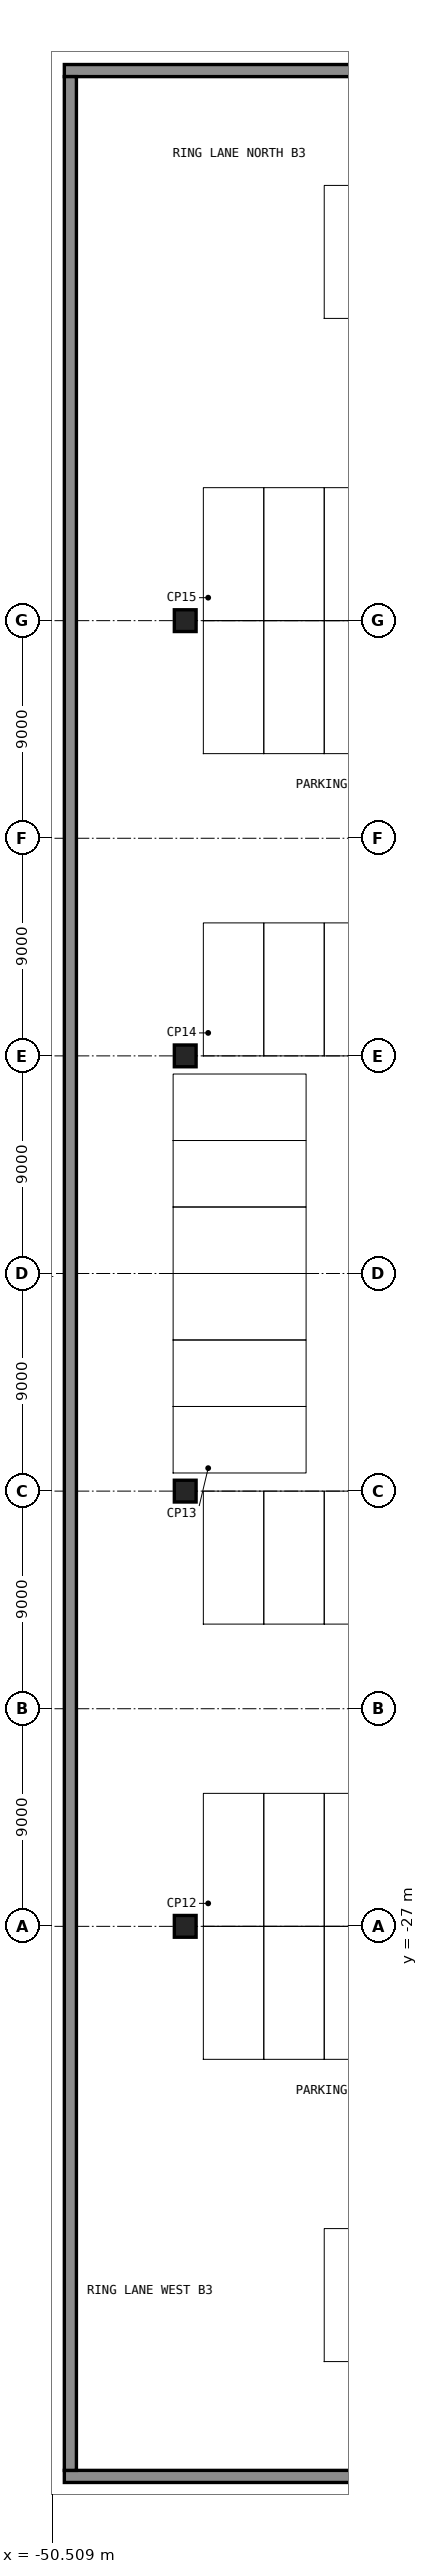
"""IFC4 building model, lengths in metres.
Left out: names, types, materials, properties, quantities, classifications, styles, units other than length and angle.
Written with IfcOpenShell. Run it as: python <this file> out.ifc"""

import sys

from ifc_helpers import new_model, si_unit, direction, frame, frame_2d, origin, origin_2d, place, context, subcontext, project, spatial, rectangle, extrude, element, save


model = new_model("IFC4")
c1 = context("Model", 3, precision=1e-05, world=origin(), true_north=direction((0.0, 1.0)))
c2 = subcontext(c1, "Body", "Model", "MODEL_VIEW")
j1 = project(units=[si_unit("LENGTHUNIT", "METRE"), si_unit("PLANEANGLEUNIT", "RADIAN")], contexts=[c1])
p1 = place(None, origin())
s1 = spatial("IfcSite", under=j1, at=p1, CompositionType="ELEMENT")
p2 = place(p1, origin())
s2 = spatial("IfcBuilding", under=s1, at=p2, CompositionType="ELEMENT")
p3 = place(p2, frame((0.0, 0.0, -12.9)))
s3 = spatial("IfcBuildingStorey", under=s2, at=p3, CompositionType="ELEMENT", Elevation=-12.9)
for number, where, z_axis, x_axis in (
    (1, (-50.0, 49.75, -0.3), (0.0, 0.0, 1.0), (1.0, 0.0, 0.0)),
    (2, (-50.0, -49.75, -0.3), (0.0, 0.0, 1.0), (1.0, 0.0, 0.0)),
):
    element("IfcWall", number, at=place(p3, frame(where, z_axis=z_axis, x_axis=x_axis)), inside=s3, PredefinedType="SOLIDWALL", context=c2, shape_type="SweptSolid", body=[
        extrude(rectangle(XDim=100.0, YDim=0.5, at=frame_2d((50.0, 0.0))), origin(), (0.0, 0.0, 1.0), 4.2),
    ])
p4 = place(p3, frame((-49.75, -49.5, -0.3), z_axis=(0.0, 0.0, 1.0), x_axis=(0.0, 1.0, 0.0)))
e3 = element("IfcWall", 3, at=p4, inside=s3, PredefinedType="SOLIDWALL", context=c2, shape_type="SweptSolid", body=[
    extrude(rectangle(XDim=99.0, YDim=0.5, at=frame_2d((49.5, 0.0))), origin(), (0.0, 0.0, 1.0), 4.2),
])
for number, where, z_axis, x_axis in (
    (4, (-45.0, -27.0, -0.3), (0.0, 0.0, 1.0), (1.0, 0.0, 0.0)),
    (5, (-45.0, -9.0, -0.3), (0.0, 0.0, 1.0), (1.0, 0.0, 0.0)),
    (6, (-45.0, 9.0, -0.3), (0.0, 0.0, 1.0), (1.0, 0.0, 0.0)),
    (7, (-45.0, 27.0, -0.3), (0.0, 0.0, 1.0), (1.0, 0.0, 0.0)),
):
    element("IfcColumn", number, at=place(p3, frame(where, z_axis=z_axis, x_axis=x_axis)), inside=s3, PredefinedType="COLUMN", context=c2, shape_type="SweptSolid", body=[
        extrude(rectangle(XDim=0.9, YDim=0.9, at=origin_2d()), origin(), (0.0, 0.0, 1.0), 4.2),
    ])
save(model, sys.argv[1])
